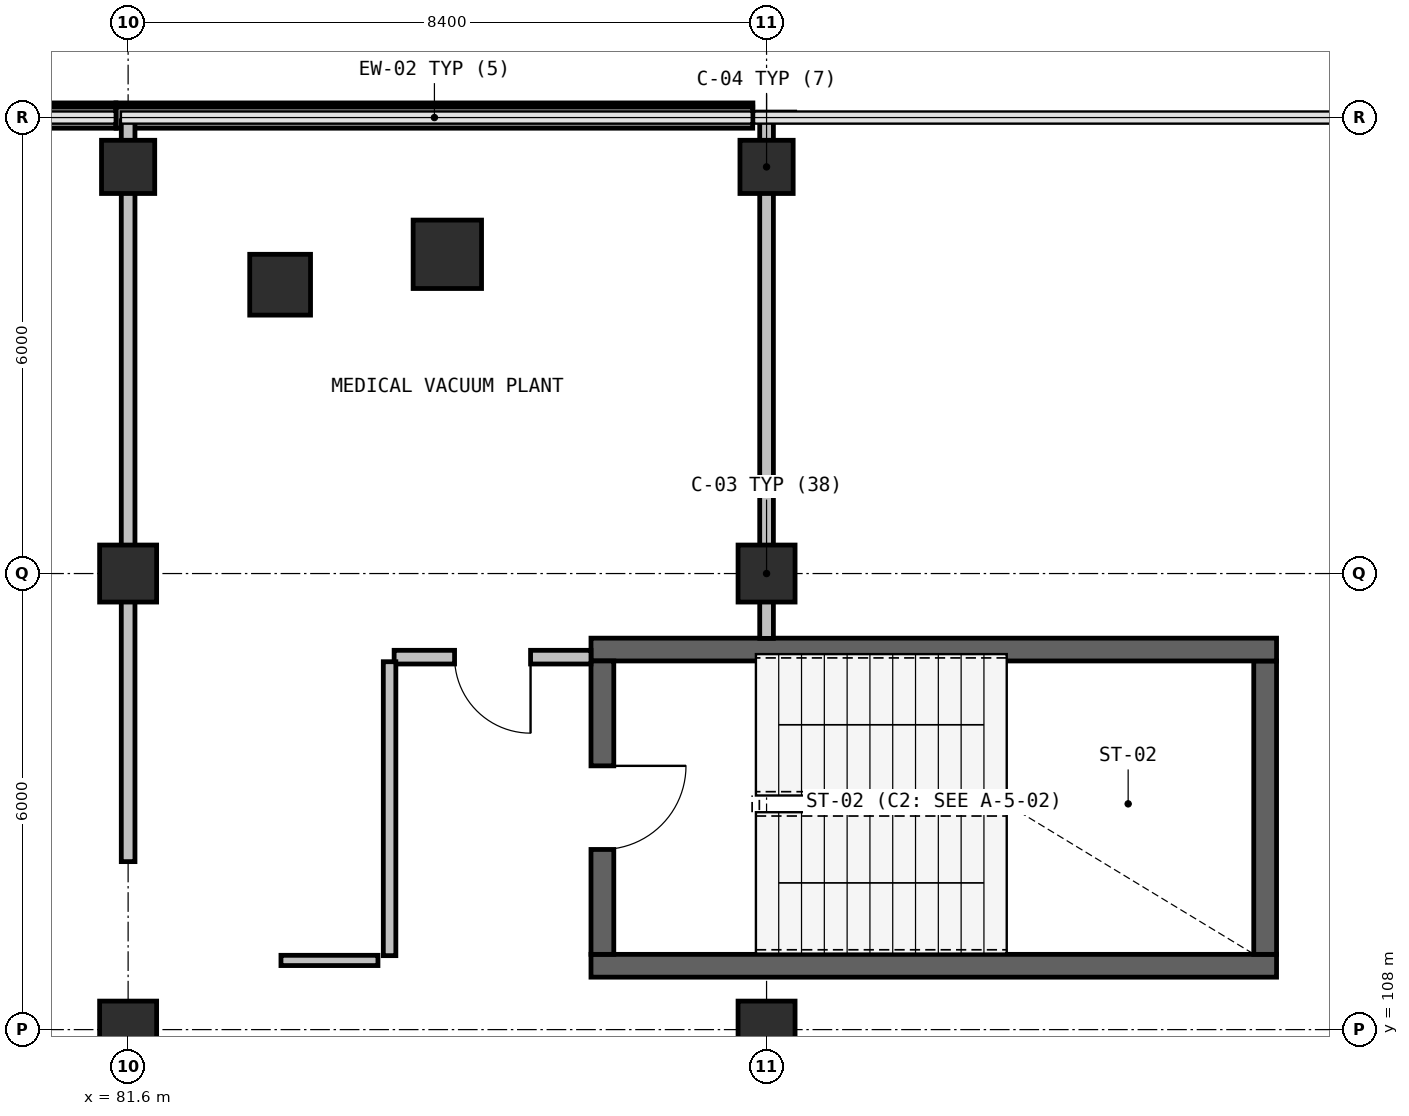
"""IFC4 building model, lengths in metres.
Left out: names, types, materials, properties, quantities, classifications, styles, units other than length and angle.
Written with IfcOpenShell. Run it as: python <this file> out.ifc"""

import sys

from ifc_helpers import new_model, si_unit, direction, frame, frame_2d, origin, origin_2d, place, context, subcontext, project, spatial, rectangle, extrude, element, fill, save


model = new_model("IFC4")
c1 = context("Model", 3, precision=1e-05, world=origin(), true_north=direction((0.0, 1.0)))
c2 = subcontext(c1, "Body", "Model", "MODEL_VIEW")
j1 = project(units=[si_unit("LENGTHUNIT", "METRE"), si_unit("PLANEANGLEUNIT", "RADIAN")], contexts=[c1])
p1 = place(None, origin())
s1 = spatial("IfcSite", under=j1, at=p1, CompositionType="ELEMENT")
p2 = place(p1, origin())
s2 = spatial("IfcBuilding", under=s1, at=p2, CompositionType="ELEMENT")
p3 = place(p2, frame((0.0, 0.0, 15.0)))
s3 = spatial("IfcBuildingStorey", under=s2, at=p3, CompositionType="ELEMENT", Elevation=15.0)
p4 = place(p3, frame((83.6, 117.8, 0.0), z_axis=(0.0, 0.0, 1.0), x_axis=(1.0, 0.0, 0.0)))
e1 = element("IfcColumn", 1, at=p4, inside=s3, PredefinedType="COLUMN", context=c2, shape_type="SweptSolid", body=[
    extrude(rectangle(XDim=0.8, YDim=0.8, at=origin_2d()), origin(), (0.0, 0.0, 1.0), 4.2),
])
p5 = place(p3, frame((85.8, 118.2, 0.0), z_axis=(0.0, 0.0, 1.0), x_axis=(1.0, 0.0, 0.0)))
e2 = element("IfcColumn", 2, at=p5, inside=s3, PredefinedType="COLUMN", context=c2, shape_type="SweptSolid", body=[
    extrude(rectangle(XDim=0.9, YDim=0.9, at=origin_2d()), origin(), (0.0, 0.0, 1.0), 4.2),
])
for number, where, z_axis, x_axis in (
    (3, (81.6, 108.0, 0.0), (0.0, 0.0, 1.0), (1.0, 0.0, 0.0)),
    (4, (81.6, 114.0, 0.0), (0.0, 0.0, 1.0), (1.0, 0.0, 0.0)),
):
    element("IfcColumn", number, at=place(p3, frame(where, z_axis=z_axis, x_axis=x_axis)), inside=s3, PredefinedType="COLUMN", context=c2, shape_type="SweptSolid", body=[
        extrude(rectangle(XDim=0.75, YDim=0.75, at=origin_2d()), origin(), (0.0, 0.0, 1.0), 4.2),
    ])
p6 = place(p3, frame((81.6, 119.35, 0.0), z_axis=(0.0, 0.0, 1.0), x_axis=(1.0, 0.0, 0.0)))
e5 = element("IfcColumn", 5, at=p6, inside=s3, PredefinedType="COLUMN", context=c2, shape_type="SweptSolid", body=[
    extrude(rectangle(XDim=0.7, YDim=0.7, at=origin_2d()), origin(), (0.0, 0.0, 1.0), 4.2),
])
for number, where, z_axis, x_axis in (
    (6, (90.0, 108.0, 0.0), (0.0, 0.0, 1.0), (1.0, 0.0, 0.0)),
    (7, (90.0, 114.0, 0.0), (0.0, 0.0, 1.0), (1.0, 0.0, 0.0)),
):
    element("IfcColumn", number, at=place(p3, frame(where, z_axis=z_axis, x_axis=x_axis)), inside=s3, PredefinedType="COLUMN", context=c2, shape_type="SweptSolid", body=[
        extrude(rectangle(XDim=0.75, YDim=0.75, at=origin_2d()), origin(), (0.0, 0.0, 1.0), 4.2),
    ])
p7 = place(p3, frame((90.0, 119.35, 0.0), z_axis=(0.0, 0.0, 1.0), x_axis=(1.0, 0.0, 0.0)))
e8 = element("IfcColumn", 8, at=p7, inside=s3, PredefinedType="COLUMN", context=c2, shape_type="SweptSolid", body=[
    extrude(rectangle(XDim=0.7, YDim=0.7, at=origin_2d()), origin(), (0.0, 0.0, 1.0), 4.2),
])
p8 = place(p3, frame((73.062, 119.999, 0.0), z_axis=(0.0, 0.0, 1.0), x_axis=(1.0, 0.0, 0.0)))
e9 = element("IfcWall", 9, at=p8, inside=s3, PredefinedType="SOLIDWALL", context=c2, shape_type="SweptSolid", body=[
    extrude(rectangle(XDim=8.376, YDim=0.28, at=frame_2d((4.188, 0.0))), origin(), (0.0, 0.0, 1.0), 0.94),
])
p9 = place(p3, frame((81.442, 119.999, 0.0), z_axis=(0.0, 0.0, 1.0), x_axis=(1.0, 0.0, 0.0)))
e10 = element("IfcWall", 10, at=p9, inside=s3, PredefinedType="SOLIDWALL", context=c2, shape_type="SweptSolid", body=[
    extrude(rectangle(XDim=8.376, YDim=0.28, at=frame_2d((4.188, 0.0))), origin(), (0.0, 0.0, 1.0), 0.94),
])
p10 = place(p3, frame((87.69, 108.84, 0.0), z_axis=(0.0, 0.0, 1.0), x_axis=(1.0, 0.0, 0.0)))
e11 = element("IfcWall", 11, at=p10, inside=s3, PredefinedType="SHEAR", context=c2, shape_type="SweptSolid", body=[
    extrude(rectangle(XDim=9.02, YDim=0.3, at=frame_2d((4.51, 0.0))), origin(), (0.0, 0.0, 1.0), 3.895),
])
p11 = place(p3, frame((96.56, 108.99, 0.0), z_axis=(0.0, 0.0, 1.0), x_axis=(0.0, 1.0, 0.0)))
e12 = element("IfcWall", 12, at=p11, inside=s3, PredefinedType="SHEAR", context=c2, shape_type="SweptSolid", body=[
    extrude(rectangle(XDim=3.86, YDim=0.3, at=frame_2d((1.93, 0.0))), origin(), (0.0, 0.0, 1.0), 3.895),
])
p12 = place(p3, frame((96.71, 113.0, 0.0), z_axis=(0.0, 0.0, 1.0), x_axis=(-1.0, 0.0, 0.0)))
e13 = element("IfcWall", 13, at=p12, inside=s3, PredefinedType="SHEAR", context=c2, shape_type="SweptSolid", body=[
    extrude(rectangle(XDim=9.02, YDim=0.3, at=frame_2d((4.51, 0.0))), origin(), (0.0, 0.0, 1.0), 3.895),
])
p13 = place(p3, frame((87.84, 112.85, 0.0), z_axis=(0.0, 0.0, 1.0), x_axis=(0.0, -1.0, 0.0)))
e14 = element("IfcWall", 14, at=p13, inside=s3, PredefinedType="SHEAR", context=c2, shape_type="SweptSolid", body=[
    extrude(rectangle(XDim=3.86, YDim=0.3, at=frame_2d((1.93, 0.0))), origin(), (0.0, 0.0, 1.0), 3.895),
])
p14 = place(p13, frame((1.38, 0.0, 0.0)))
e15 = element("IfcOpeningElement", 15, at=p14, cuts=e14, PredefinedType="OPENING", context=c2, shape_type="SweptSolid", body=[
    extrude(rectangle(XDim=1.1, YDim=2.15, at=frame_2d((0.55, 1.075))), frame((0.0, 0.16, 0.0), z_axis=(0.0, -1.0, 0.0), x_axis=(1.0, 0.0, 0.0)), (0.0, 0.0, 1.0), 0.32),
])
p15 = place(p3, frame((81.6, 119.957, 0.0), z_axis=(0.0, 0.0, 1.0), x_axis=(0.0, -1.0, 0.0)))
e16 = element("IfcWall", 16, at=p15, inside=s3, PredefinedType="PARTITIONING", context=c2, shape_type="SweptSolid", body=[
    extrude(rectangle(XDim=9.747, YDim=0.18, at=frame_2d((4.874, 0.0))), origin(), (0.0, 0.0, 1.0), 3.245),
])
p16 = place(p3, frame((87.69, 112.9, 0.0), z_axis=(0.0, 0.0, 1.0), x_axis=(-1.0, 0.0, 0.0)))
e17 = element("IfcWall", 17, at=p16, inside=s3, PredefinedType="PARTITIONING", context=c2, shape_type="SweptSolid", body=[
    extrude(rectangle(XDim=2.59, YDim=0.18, at=frame_2d((1.295, 0.0))), origin(), (0.0, 0.0, 1.0), 3.895),
])
p17 = place(p16, frame((0.795, 0.0, 0.0)))
e18 = element("IfcOpeningElement", 18, at=p17, cuts=e17, PredefinedType="OPENING", context=c2, shape_type="SweptSolid", body=[
    extrude(rectangle(XDim=1.0, YDim=2.15, at=frame_2d((0.5, 1.075))), frame((0.0, 0.1, 0.0), z_axis=(0.0, -1.0, 0.0), x_axis=(1.0, 0.0, 0.0)), (0.0, 0.0, 1.0), 0.2),
])
p18 = place(p3, frame((85.04, 112.84, 0.0), z_axis=(0.0, 0.0, 1.0), x_axis=(0.0, -1.0, 0.0)))
e19 = element("IfcWall", 19, at=p18, inside=s3, PredefinedType="PARTITIONING", context=c2, shape_type="SweptSolid", body=[
    extrude(rectangle(XDim=3.867, YDim=0.165, at=frame_2d((1.934, 0.0))), origin(), (0.0, 0.0, 1.0), 3.895),
])
p19 = place(p3, frame((84.887, 108.91, 0.0), z_axis=(0.0, 0.0, 1.0), x_axis=(-1.0, 0.0, 0.0)))
e20 = element("IfcWall", 20, at=p19, inside=s3, PredefinedType="PARTITIONING", context=c2, shape_type="SweptSolid", body=[
    extrude(rectangle(XDim=1.276, YDim=0.135, at=frame_2d((0.638, 0.0))), origin(), (0.0, 0.0, 1.0), 3.895),
])
p20 = place(p3, frame((90.0, 119.988, 0.0), z_axis=(0.0, 0.0, 1.0), x_axis=(0.0, -1.0, 0.0)))
e21 = element("IfcWall", 21, at=p20, inside=s3, PredefinedType="PARTITIONING", context=c2, shape_type="SweptSolid", body=[
    extrude(rectangle(XDim=6.841, YDim=0.18, at=frame_2d((3.42, 0.0))), origin(), (0.0, 0.0, 1.0), 3.245),
])
p21 = place(p14, origin())
e22 = element("IfcDoor", 22, at=p21, inside=s3, OperationType="SINGLE_SWING_RIGHT", PredefinedType="DOOR", context=c2, shape_type="SweptSolid", body=[
    extrude(rectangle(XDim=1.1, YDim=2.15, at=frame_2d((0.55, 1.075))), frame((0.0, 0.025, 0.0), z_axis=(0.0, -1.0, 0.0), x_axis=(1.0, 0.0, 0.0)), (0.0, 0.0, 1.0), 0.05),
])
fill(e15, e22)
p22 = place(p17, origin())
e23 = element("IfcDoor", 23, at=p22, inside=s3, OperationType="SINGLE_SWING_RIGHT", PredefinedType="DOOR", context=c2, shape_type="SweptSolid", body=[
    extrude(rectangle(XDim=1.0, YDim=2.15, at=frame_2d((0.5, 1.075))), frame((0.0, 0.025, 0.0), z_axis=(0.0, -1.0, 0.0), x_axis=(1.0, 0.0, 0.0)), (0.0, 0.0, 1.0), 0.05),
])
fill(e18, e23)
save(model, sys.argv[1])
